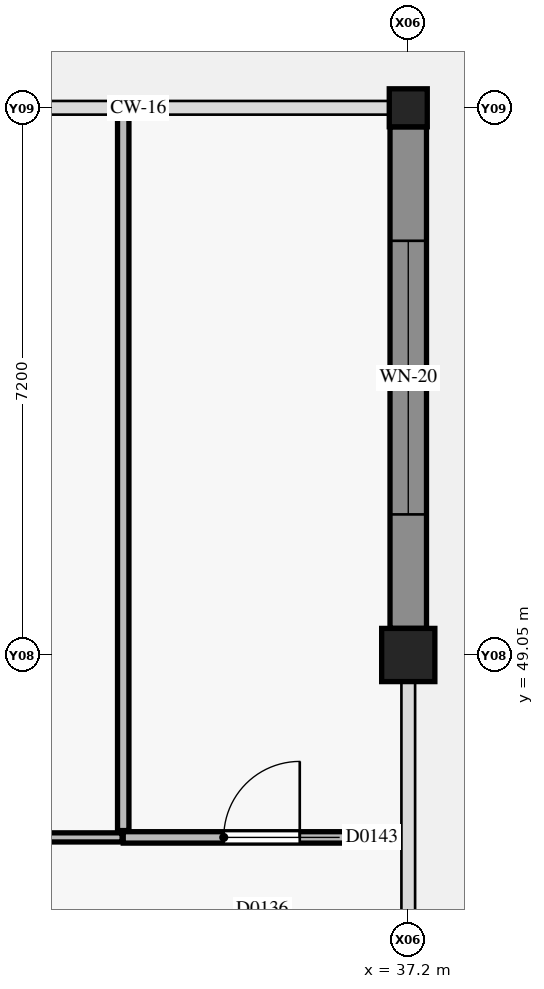
"""IFC4 building model, lengths in metres.
Left out: names, types, materials, properties, quantities, classifications, styles, units other than length and angle.
Written with IfcOpenShell. Run it as: python <this file> out.ifc"""

import sys

from ifc_helpers import new_model, si_unit, direction, frame, frame_2d, origin, origin_2d, place, context, subcontext, project, spatial, rectangle, circle, extrude, element, fill, save


model = new_model("IFC4")
c1 = context("Model", 3, precision=1e-05, world=origin(), true_north=direction((0.0, 1.0)))
c2 = subcontext(c1, "Body", "Model", "MODEL_VIEW")
j1 = project(units=[si_unit("LENGTHUNIT", "METRE"), si_unit("PLANEANGLEUNIT", "RADIAN")], contexts=[c1])
p1 = place(None, origin())
s1 = spatial("IfcSite", under=j1, at=p1, CompositionType="ELEMENT")
p2 = place(p1, origin())
s2 = spatial("IfcBuilding", under=s1, at=p2, CompositionType="ELEMENT")
p3 = place(p2, origin())
s3 = spatial("IfcBuildingStorey", under=s2, at=p3, CompositionType="ELEMENT", Elevation=0.0)
p4 = place(p3, frame((37.2, 49.05, 0.0), z_axis=(0.0, 0.0, 1.0), x_axis=(1.0, 0.0, 0.0)))
e1 = element("IfcColumn", 1, at=p4, inside=s3, PredefinedType="COLUMN", context=c2, shape_type="SweptSolid", body=[
    extrude(circle(Radius=0.35, at=origin_2d()), origin(), (0.0, 0.0, 1.0), 4.65),
])
p5 = place(p3, frame((37.2, 56.25, 0.0), z_axis=(0.0, 0.0, 1.0), x_axis=(1.0, 0.0, 0.0)))
e2 = element("IfcColumn", 2, at=p5, inside=s3, PredefinedType="COLUMN", context=c2, shape_type="SweptSolid", body=[
    extrude(rectangle(XDim=0.5, YDim=0.5, at=origin_2d()), origin(), (0.0, 0.0, 1.0), 4.96),
])
p6 = place(p3, frame((37.2, 56.0, 0.0), z_axis=(0.0, 0.0, 1.0), x_axis=(0.0, -1.0, 0.0)))
e3 = element("IfcWall", 3, at=p6, inside=s3, PredefinedType="SOLIDWALL", context=c2, shape_type="SweptSolid", body=[
    extrude(rectangle(XDim=6.6, YDim=0.48, at=frame_2d((3.3, 0.0))), origin(), (0.0, 0.0, 1.0), 3.98),
])
p7 = place(p6, frame((1.5, 0.0, 0.6)))
e4 = element("IfcOpeningElement", 4, at=p7, cuts=e3, PredefinedType="OPENING", context=c2, shape_type="SweptSolid", body=[
    extrude(rectangle(XDim=3.6, YDim=2.2, at=frame_2d((1.8, 1.1))), frame((0.0, 0.25, 0.0), z_axis=(0.0, -1.0, 0.0), x_axis=(1.0, 0.0, 0.0)), (0.0, 0.0, 1.0), 0.5),
])
p8 = place(p3, frame((33.45, 46.65, 0.0), z_axis=(0.0, 0.0, 1.0), x_axis=(1.0, 0.0, 0.0)))
e5 = element("IfcWall", 5, at=p8, inside=s3, PredefinedType="PARTITIONING", context=c2, shape_type="SweptSolid", body=[
    extrude(rectangle(XDim=3.645, YDim=0.15, at=frame_2d((1.823, 0.0))), origin(), (0.0, 0.0, 1.0), 4.55),
])
p9 = place(p8, frame((1.323, 0.0, 0.0)))
e6 = element("IfcOpeningElement", 6, at=p9, cuts=e5, PredefinedType="OPENING", context=c2, shape_type="SweptSolid", body=[
    extrude(rectangle(XDim=1.0, YDim=2.15, at=frame_2d((0.5, 1.075))), frame((0.0, 0.085, 0.0), z_axis=(0.0, -1.0, 0.0), x_axis=(1.0, 0.0, 0.0)), (0.0, 0.0, 1.0), 0.17),
])
p10 = place(p3, frame((30.015, 46.65, 0.0), z_axis=(0.0, 0.0, 1.0), x_axis=(1.0, 0.0, 0.0)))
e7 = element("IfcWall", 7, at=p10, inside=s3, PredefinedType="PARTITIONING", context=c2, shape_type="SweptSolid", body=[
    extrude(rectangle(XDim=3.42, YDim=0.12, at=frame_2d((1.71, 0.0))), origin(), (0.0, 0.0, 1.0), 4.55),
])
p11 = place(p10, frame((1.185, 0.0, 0.0)))
e8 = element("IfcOpeningElement", 8, at=p11, cuts=e7, PredefinedType="OPENING", context=c2, shape_type="SweptSolid", body=[
    extrude(rectangle(XDim=1.05, YDim=2.15, at=frame_2d((0.525, 1.075))), frame((0.0, 0.07, 0.0), z_axis=(0.0, -1.0, 0.0), x_axis=(1.0, 0.0, 0.0)), (0.0, 0.0, 1.0), 0.14),
])
p12 = place(p3, frame((33.45, 46.74, 0.0), z_axis=(0.0, 0.0, 1.0), x_axis=(0.0, 1.0, 0.0)))
e9 = element("IfcWall", 9, at=p12, inside=s3, PredefinedType="PARTITIONING", context=c2, shape_type="SweptSolid", body=[
    extrude(rectangle(XDim=9.405, YDim=0.15, at=frame_2d((4.703, 0.0))), origin(), (0.0, 0.0, 1.0), 4.04),
])
p13 = place(p7, origin())
e10 = element("IfcWindow", 10, at=p13, inside=s3, PartitioningType="SINGLE_PANEL", PredefinedType="WINDOW", context=c2, shape_type="SweptSolid", body=[
    extrude(rectangle(XDim=3.6, YDim=2.2, at=frame_2d((1.8, 1.1))), frame((0.0, 0.03, 0.0), z_axis=(0.0, -1.0, 0.0), x_axis=(1.0, 0.0, 0.0)), (0.0, 0.0, 1.0), 0.06),
])
fill(e4, e10)
p14 = place(p9, origin())
e11 = element("IfcDoor", 11, at=p14, inside=s3, OperationType="SINGLE_SWING_RIGHT", PredefinedType="DOOR", context=c2, shape_type="SweptSolid", body=[
    extrude(rectangle(XDim=1.0, YDim=2.15, at=frame_2d((0.5, 1.075))), frame((0.0, 0.025, 0.0), z_axis=(0.0, -1.0, 0.0), x_axis=(1.0, 0.0, 0.0)), (0.0, 0.0, 1.0), 0.05),
])
fill(e6, e11)
save(model, sys.argv[1])
